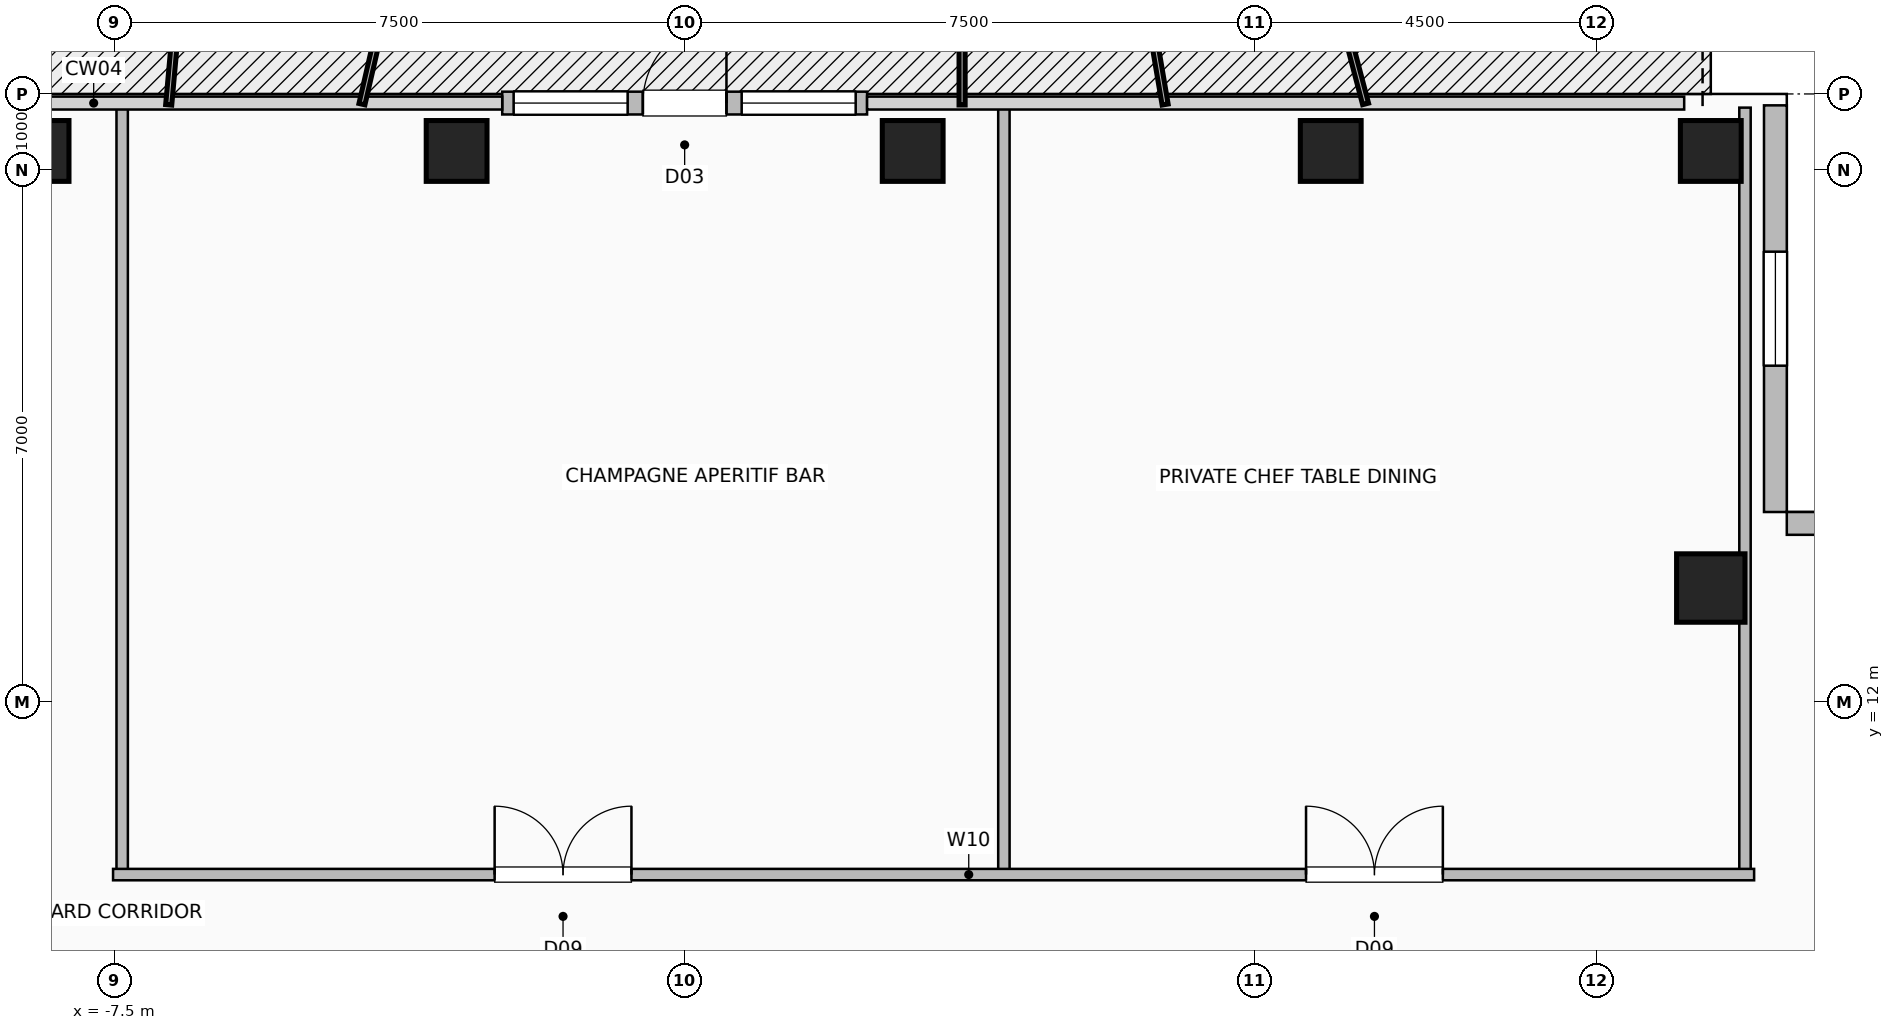
"""IFC4 building model, lengths in metres.
Left out: names, types, materials, properties, quantities, classifications, styles, units other than length and angle.
Written with IfcOpenShell. Run it as: python <this file> out.ifc"""

import sys

from ifc_helpers import new_model, si_unit, direction, frame, frame_2d, origin, origin_2d, place, context, subcontext, project, spatial, rectangle, hollow_rectangle, extrude, element, fill, save


model = new_model("IFC4")
c1 = context("Model", 3, precision=1e-05, world=origin(), true_north=direction((0.0, 1.0)))
c2 = subcontext(c1, "Body", "Model", "MODEL_VIEW")
j1 = project(units=[si_unit("LENGTHUNIT", "METRE"), si_unit("PLANEANGLEUNIT", "RADIAN")], contexts=[c1])
p1 = place(None, origin())
s1 = spatial("IfcSite", under=j1, at=p1, CompositionType="ELEMENT")
p2 = place(p1, origin())
s2 = spatial("IfcBuilding", under=s1, at=p2, CompositionType="ELEMENT")
p3 = place(p2, frame((0.0, 0.0, 195.0)))
s3 = spatial("IfcBuildingStorey", under=s2, at=p3, CompositionType="ELEMENT", Elevation=195.0)
for number, where, z_axis, x_axis in (
    (1, (-8.5, 19.25, 0.0), (0.0, 0.0, 1.0), (1.0, 0.0, 0.0)),
    (2, (-3.0, 19.25, 0.0), (0.0, 0.0, 1.0), (1.0, 0.0, 0.0)),
    (3, (3.0, 19.25, 0.0), (0.0, 0.0, 1.0), (1.0, 0.0, 0.0)),
    (4, (8.5, 19.25, 0.0), (0.0, 0.0, 1.0), (1.0, 0.0, 0.0)),
    (5, (13.5, 19.25, 0.0), (0.0, 0.0, 1.0), (1.0, 0.0, 0.0)),
):
    element("IfcColumn", number, at=place(p3, frame(where, z_axis=z_axis, x_axis=x_axis)), inside=s3, PredefinedType="COLUMN", context=c2, shape_type="SweptSolid", body=[
        extrude(hollow_rectangle(XDim=0.8, YDim=0.8, WallThickness=0.04, at=origin_2d()), origin(), (0.0, 0.0, 1.0), 3.6),
    ])
p4 = place(p3, frame((13.5, 13.5, 0.0), z_axis=(0.0, 0.0, 1.0), x_axis=(1.0, 0.0, 0.0)))
e6 = element("IfcColumn", 6, at=p4, inside=s3, PredefinedType="COLUMN", context=c2, shape_type="SweptSolid", body=[
    extrude(hollow_rectangle(XDim=0.9, YDim=0.9, WallThickness=0.045, at=origin_2d()), origin(), (0.0, 0.0, 1.0), 3.6),
])
p5 = place(p3, frame((-2.4, 19.88, 0.0), z_axis=(0.0, 0.0, 1.0), x_axis=(1.0, 0.0, 0.0)))
e7 = element("IfcWall", 7, at=p5, inside=s3, PredefinedType="SOLIDWALL", context=c2, shape_type="SweptSolid", body=[
    extrude(rectangle(XDim=4.8, YDim=0.3, at=frame_2d((2.4, 0.0))), origin(), (0.0, 0.0, 1.0), 3.36),
])
p6 = place(p5, frame((1.85, 0.0, 0.0)))
e8 = element("IfcOpeningElement", 8, at=p6, cuts=e7, PredefinedType="OPENING", context=c2, shape_type="SweptSolid", body=[
    extrude(rectangle(XDim=1.1, YDim=2.2, at=frame_2d((0.55, 1.1))), frame((0.0, 0.16, 0.0), z_axis=(0.0, -1.0, 0.0), x_axis=(1.0, 0.0, 0.0)), (0.0, 0.0, 1.0), 0.32),
])
p7 = place(p5, frame((0.15, 0.0, 0.85)))
e9 = element("IfcOpeningElement", 9, at=p7, cuts=e7, PredefinedType="OPENING", context=c2, shape_type="SweptSolid", body=[
    extrude(rectangle(XDim=1.5, YDim=1.8, at=frame_2d((0.75, 0.9))), frame((0.0, 0.16, 0.0), z_axis=(0.0, -1.0, 0.0), x_axis=(1.0, 0.0, 0.0)), (0.0, 0.0, 1.0), 0.32),
])
p8 = place(p5, frame((3.15, 0.0, 0.85)))
e10 = element("IfcOpeningElement", 10, at=p8, cuts=e7, PredefinedType="OPENING", context=c2, shape_type="SweptSolid", body=[
    extrude(rectangle(XDim=1.5, YDim=1.8, at=frame_2d((0.75, 0.9))), frame((0.0, 0.16, 0.0), z_axis=(0.0, -1.0, 0.0), x_axis=(1.0, 0.0, 0.0)), (0.0, 0.0, 1.0), 0.32),
])
p9 = place(p3, frame((14.35, 19.85, 0.0), z_axis=(0.0, 0.0, 1.0), x_axis=(0.0, -1.0, 0.0)))
e11 = element("IfcWall", 11, at=p9, inside=s3, PredefinedType="SOLIDWALL", context=c2, shape_type="SweptSolid", body=[
    extrude(rectangle(XDim=5.35, YDim=0.3, at=frame_2d((2.675, 0.0))), origin(), (0.0, 0.0, 1.0), 3.36),
])
p10 = place(p9, frame((1.925, 0.0, 0.9)))
e12 = element("IfcOpeningElement", 12, at=p10, cuts=e11, PredefinedType="OPENING", context=c2, shape_type="SweptSolid", body=[
    extrude(rectangle(XDim=1.5, YDim=1.8, at=frame_2d((0.75, 0.9))), frame((0.0, 0.16, 0.0), z_axis=(0.0, -1.0, 0.0), x_axis=(1.0, 0.0, 0.0)), (0.0, 0.0, 1.0), 0.32),
])
p11 = place(p3, frame((19.85, 14.35, 0.0), z_axis=(0.0, 0.0, 1.0), x_axis=(-1.0, 0.0, 0.0)))
e13 = element("IfcWall", 13, at=p11, inside=s3, PredefinedType="SOLIDWALL", context=c2, shape_type="SweptSolid", body=[
    extrude(rectangle(XDim=5.35, YDim=0.3, at=frame_2d((2.675, 0.0))), origin(), (0.0, 0.0, 1.0), 3.36),
])
for number, where, z_axis, x_axis in (
    (14, (-7.4, 9.73, 0.0), (0.0, 0.0, 1.0), (0.0, 1.0, 0.0)),
    (15, (4.2, 9.73, 0.0), (0.0, 0.0, 1.0), (0.0, 1.0, 0.0)),
    (16, (13.95, 9.73, 0.0), (0.0, 0.0, 1.0), (0.0, 1.0, 0.0)),
):
    element("IfcWall", number, at=place(p3, frame(where, z_axis=z_axis, x_axis=x_axis)), inside=s3, PredefinedType="PARTITIONING", context=c2, shape_type="SweptSolid", body=[
        extrude(rectangle(XDim=10.09, YDim=0.15, at=frame_2d((5.045, 0.0))), origin(), (0.0, 0.0, 1.0), 3.36),
    ])
p12 = place(p3, frame((-7.52, 9.73, 0.0), z_axis=(0.0, 0.0, 1.0), x_axis=(1.0, 0.0, 0.0)))
e17 = element("IfcWall", 17, at=p12, inside=s3, PredefinedType="PARTITIONING", context=c2, shape_type="SweptSolid", body=[
    extrude(rectangle(XDim=21.59, YDim=0.15, at=frame_2d((10.795, 0.0))), origin(), (0.0, 0.0, 1.0), 3.36),
])
p13 = place(p12, frame((5.02, 0.0, 0.0)))
e18 = element("IfcOpeningElement", 18, at=p13, cuts=e17, PredefinedType="OPENING", context=c2, shape_type="SweptSolid", body=[
    extrude(rectangle(XDim=1.8, YDim=2.08, at=frame_2d((0.9, 1.04))), frame((0.0, 0.085, 0.0), z_axis=(0.0, -1.0, 0.0), x_axis=(1.0, 0.0, 0.0)), (0.0, 0.0, 1.0), 0.17),
])
p14 = place(p12, frame((15.695, 0.0, 0.0)))
e19 = element("IfcOpeningElement", 19, at=p14, cuts=e17, PredefinedType="OPENING", context=c2, shape_type="SweptSolid", body=[
    extrude(rectangle(XDim=1.8, YDim=2.08, at=frame_2d((0.9, 1.04))), frame((0.0, 0.085, 0.0), z_axis=(0.0, -1.0, 0.0), x_axis=(1.0, 0.0, 0.0)), (0.0, 0.0, 1.0), 0.17),
])
p15 = place(p6, origin())
e20 = element("IfcDoor", 20, at=p15, inside=s3, OperationType="SINGLE_SWING_RIGHT", PredefinedType="DOOR", context=c2, shape_type="SweptSolid", body=[
    extrude(rectangle(XDim=1.1, YDim=2.2, at=frame_2d((0.55, 1.1))), frame((0.0, 0.025, 0.0), z_axis=(0.0, -1.0, 0.0), x_axis=(1.0, 0.0, 0.0)), (0.0, 0.0, 1.0), 0.05),
])
fill(e8, e20)
p16 = place(p7, origin())
e21 = element("IfcWindow", 21, at=p16, inside=s3, PartitioningType="SINGLE_PANEL", PredefinedType="WINDOW", context=c2, shape_type="SweptSolid", body=[
    extrude(rectangle(XDim=1.5, YDim=1.8, at=frame_2d((0.75, 0.9))), frame((0.0, 0.03, 0.0), z_axis=(0.0, -1.0, 0.0), x_axis=(1.0, 0.0, 0.0)), (0.0, 0.0, 1.0), 0.06),
])
fill(e9, e21)
p17 = place(p8, origin())
e22 = element("IfcWindow", 22, at=p17, inside=s3, PartitioningType="SINGLE_PANEL", PredefinedType="WINDOW", context=c2, shape_type="SweptSolid", body=[
    extrude(rectangle(XDim=1.5, YDim=1.8, at=frame_2d((0.75, 0.9))), frame((0.0, 0.03, 0.0), z_axis=(0.0, -1.0, 0.0), x_axis=(1.0, 0.0, 0.0)), (0.0, 0.0, 1.0), 0.06),
])
fill(e10, e22)
p18 = place(p10, origin())
e23 = element("IfcWindow", 23, at=p18, inside=s3, PartitioningType="SINGLE_PANEL", PredefinedType="WINDOW", context=c2, shape_type="SweptSolid", body=[
    extrude(rectangle(XDim=1.5, YDim=1.8, at=frame_2d((0.75, 0.9))), frame((0.0, 0.03, 0.0), z_axis=(0.0, -1.0, 0.0), x_axis=(1.0, 0.0, 0.0)), (0.0, 0.0, 1.0), 0.06),
])
fill(e12, e23)
p19 = place(p13, origin())
e24 = element("IfcDoor", 24, at=p19, inside=s3, OperationType="DOUBLE_DOOR_SINGLE_SWING", PredefinedType="DOOR", context=c2, shape_type="SweptSolid", body=[
    extrude(rectangle(XDim=1.8, YDim=2.08, at=frame_2d((0.9, 1.04))), frame((0.0, 0.025, 0.0), z_axis=(0.0, -1.0, 0.0), x_axis=(1.0, 0.0, 0.0)), (0.0, 0.0, 1.0), 0.05),
])
fill(e18, e24)
p20 = place(p14, origin())
e25 = element("IfcDoor", 25, at=p20, inside=s3, OperationType="DOUBLE_DOOR_SINGLE_SWING", PredefinedType="DOOR", context=c2, shape_type="SweptSolid", body=[
    extrude(rectangle(XDim=1.8, YDim=2.08, at=frame_2d((0.9, 1.04))), frame((0.0, 0.025, 0.0), z_axis=(0.0, -1.0, 0.0), x_axis=(1.0, 0.0, 0.0)), (0.0, 0.0, 1.0), 0.05),
])
fill(e19, e25)
save(model, sys.argv[1])
